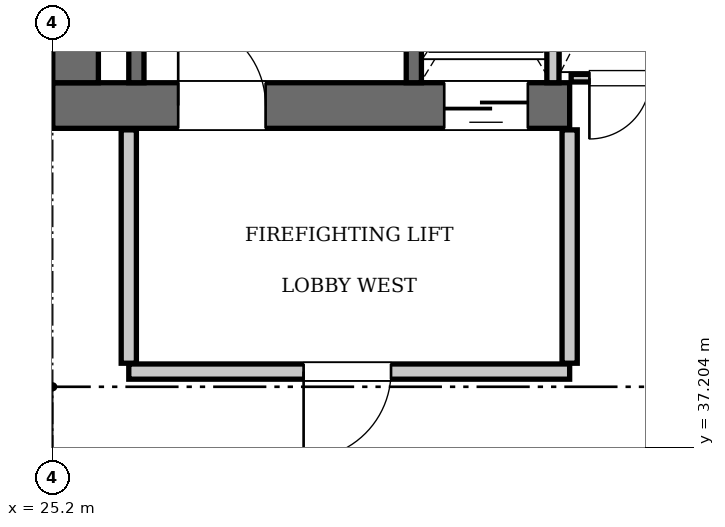
"""IFC4 building model, lengths in metres.
Left out: names, types, materials, properties, quantities, classifications, styles, units other than length and angle.
Written with IfcOpenShell. Run it as: python <this file> out.ifc"""

import sys

from ifc_helpers import new_model, si_unit, direction, frame, frame_2d, origin, place, context, subcontext, project, spatial, rectangle, extrude, element, fill, save


model = new_model("IFC4")
c1 = context("Model", 3, precision=1e-05, world=origin(), true_north=direction((0.0, 1.0)))
c2 = subcontext(c1, "Body", "Model", "MODEL_VIEW")
j1 = project(units=[si_unit("LENGTHUNIT", "METRE"), si_unit("PLANEANGLEUNIT", "RADIAN")], contexts=[c1])
p1 = place(None, origin())
s1 = spatial("IfcSite", under=j1, at=p1, CompositionType="ELEMENT")
p2 = place(p1, origin())
s2 = spatial("IfcBuilding", under=s1, at=p2, CompositionType="ELEMENT")
p3 = place(p2, frame((0.0, 0.0, 293.3)))
s3 = spatial("IfcBuildingStorey", under=s2, at=p3, CompositionType="ELEMENT", Elevation=293.3)
p4 = place(p3, frame((25.2, 41.7, 0.0), z_axis=(0.0, 0.0, 1.0), x_axis=(1.0, 0.0, 0.0)))
e1 = element("IfcWall", 1, at=p4, inside=s3, PredefinedType="SHEAR", context=c2, shape_type="SweptSolid", body=[
    extrude(rectangle(XDim=6.8, YDim=0.6, at=frame_2d((3.4, 0.0))), origin(), (0.0, 0.0, 1.0), 3.85),
])
p5 = place(p4, frame((1.65, 0.0, 0.0)))
e2 = element("IfcOpeningElement", 2, at=p5, cuts=e1, PredefinedType="OPENING", context=c2, shape_type="SweptSolid", body=[
    extrude(rectangle(XDim=1.15, YDim=2.15, at=frame_2d((0.575, 1.075))), frame((0.0, 0.31, 0.0), z_axis=(0.0, -1.0, 0.0), x_axis=(1.0, 0.0, 0.0)), (0.0, 0.0, 1.0), 0.62),
])
p6 = place(p4, frame((5.15, 0.0, 0.0)))
e3 = element("IfcOpeningElement", 3, at=p6, cuts=e1, PredefinedType="OPENING", context=c2, shape_type="SweptSolid", body=[
    extrude(rectangle(XDim=1.1, YDim=2.2, at=frame_2d((0.55, 1.1))), frame((0.0, 0.31, 0.0), z_axis=(0.0, -1.0, 0.0), x_axis=(1.0, 0.0, 0.0)), (0.0, 0.0, 1.0), 0.62),
])
p7 = place(p3, frame((25.5, 42.0, 0.0), z_axis=(0.0, 0.0, 1.0), x_axis=(0.0, 1.0, 0.0)))
e4 = element("IfcWall", 4, at=p7, inside=s3, PredefinedType="SHEAR", context=c2, shape_type="SweptSolid", body=[
    extrude(rectangle(XDim=2.2, YDim=0.6, at=frame_2d((1.1, 0.0))), origin(), (0.0, 0.0, 1.0), 3.85),
])
p8 = place(p3, frame((29.95, 42.0, 0.0), z_axis=(0.0, 0.0, 1.0), x_axis=(0.0, 1.0, 0.0)))
e5 = element("IfcWall", 5, at=p8, inside=s3, PredefinedType="SOLIDWALL", context=c2, shape_type="SweptSolid", body=[
    extrude(rectangle(XDim=9.15, YDim=0.2, at=frame_2d((4.575, 0.0))), origin(), (0.0, 0.0, 1.0), 3.61),
])
p9 = place(p3, frame((26.3, 42.0, 0.0), z_axis=(0.0, 0.0, 1.0), x_axis=(0.0, 1.0, 0.0)))
e6 = element("IfcWall", 6, at=p9, inside=s3, PredefinedType="SOLIDWALL", context=c2, shape_type="SweptSolid", body=[
    extrude(rectangle(XDim=9.12, YDim=0.2, at=frame_2d((4.56, 0.0))), origin(), (0.0, 0.0, 1.0), 3.61),
])
p10 = place(p3, frame((31.78, 42.0, 0.0), z_axis=(0.0, 0.0, 1.0), x_axis=(0.0, 1.0, 0.0)))
e7 = element("IfcWall", 7, at=p10, inside=s3, PredefinedType="SOLIDWALL", context=c2, shape_type="SweptSolid", body=[
    extrude(rectangle(XDim=2.74, YDim=0.16, at=frame_2d((1.37, 0.0))), origin(), (0.0, 0.0, 1.0), 3.61),
])
p11 = place(p3, frame((26.2, 38.2, 0.0), z_axis=(0.0, 0.0, 1.0), x_axis=(1.0, 0.0, 0.0)))
e8 = element("IfcWall", 8, at=p11, inside=s3, PredefinedType="PARTITIONING", context=c2, shape_type="SweptSolid", body=[
    extrude(rectangle(XDim=5.8, YDim=0.2, at=frame_2d((2.9, 0.0))), origin(), (0.0, 0.0, 1.0), 3.61),
])
p12 = place(p11, frame((2.3, 0.0, 0.0)))
e9 = element("IfcOpeningElement", 9, at=p12, cuts=e8, PredefinedType="OPENING", context=c2, shape_type="SweptSolid", body=[
    extrude(rectangle(XDim=1.15, YDim=2.15, at=frame_2d((0.575, 1.075))), frame((0.0, 0.11, 0.0), z_axis=(0.0, -1.0, 0.0), x_axis=(1.0, 0.0, 0.0)), (0.0, 0.0, 1.0), 0.22),
])
for number, where, z_axis, x_axis in (
    (10, (26.2, 38.31, 0.0), (0.0, 0.0, 1.0), (0.0, 1.0, 0.0)),
    (11, (32.0, 38.31, 0.0), (0.0, 0.0, 1.0), (0.0, 1.0, 0.0)),
):
    element("IfcWall", number, at=place(p3, frame(where, z_axis=z_axis, x_axis=x_axis)), inside=s3, PredefinedType="PARTITIONING", context=c2, shape_type="SweptSolid", body=[
        extrude(rectangle(XDim=3.07, YDim=0.2, at=frame_2d((1.535, 0.0))), origin(), (0.0, 0.0, 1.0), 3.61),
    ])
p13 = place(p3, frame((32.02, 42.06, 0.0), z_axis=(0.0, 0.0, 1.0), x_axis=(1.0, 0.0, 0.0)))
e12 = element("IfcWall", 12, at=p13, inside=s3, PredefinedType="PARTITIONING", context=c2, shape_type="SweptSolid", body=[
    extrude(rectangle(XDim=1.32, YDim=0.1, at=frame_2d((0.66, 0.0))), origin(), (0.0, 0.0, 1.0), 3.61),
])
p14 = place(p13, frame((0.24, 0.0, 0.0)))
e13 = element("IfcOpeningElement", 13, at=p14, cuts=e12, PredefinedType="OPENING", context=c2, shape_type="SweptSolid", body=[
    extrude(rectangle(XDim=0.8, YDim=2.05, at=frame_2d((0.4, 1.025))), frame((0.0, 0.06, 0.0), z_axis=(0.0, -1.0, 0.0), x_axis=(1.0, 0.0, 0.0)), (0.0, 0.0, 1.0), 0.12),
])
p15 = place(p5, origin())
e14 = element("IfcDoor", 14, at=p15, inside=s3, OperationType="SINGLE_SWING_LEFT", PredefinedType="DOOR", context=c2, shape_type="SweptSolid", body=[
    extrude(rectangle(XDim=1.15, YDim=2.15, at=frame_2d((0.575, 1.075))), frame((0.0, 0.025, 0.0), z_axis=(0.0, -1.0, 0.0), x_axis=(1.0, 0.0, 0.0)), (0.0, 0.0, 1.0), 0.05),
])
fill(e2, e14)
p16 = place(p6, frame((1.1, 0.0, 0.0), z_axis=(0.0, 0.0, 1.0), x_axis=(-1.0, 0.0, 0.0)))
e15 = element("IfcDoor", 15, at=p16, inside=s3, OperationType="SLIDING_TO_LEFT", PredefinedType="DOOR", context=c2, shape_type="SweptSolid", body=[
    extrude(rectangle(XDim=1.1, YDim=2.2, at=frame_2d((0.55, 1.1))), frame((0.0, 0.025, 0.0), z_axis=(0.0, -1.0, 0.0), x_axis=(1.0, 0.0, 0.0)), (0.0, 0.0, 1.0), 0.05),
])
fill(e3, e15)
p17 = place(p12, frame((1.15, 0.0, 0.0), z_axis=(0.0, 0.0, 1.0), x_axis=(-1.0, 0.0, 0.0)))
e16 = element("IfcDoor", 16, at=p17, inside=s3, OperationType="SINGLE_SWING_RIGHT", PredefinedType="DOOR", context=c2, shape_type="SweptSolid", body=[
    extrude(rectangle(XDim=1.15, YDim=2.15, at=frame_2d((0.575, 1.075))), frame((0.0, 0.025, 0.0), z_axis=(0.0, -1.0, 0.0), x_axis=(1.0, 0.0, 0.0)), (0.0, 0.0, 1.0), 0.05),
])
fill(e9, e16)
p18 = place(p14, frame((0.8, 0.0, 0.0), z_axis=(0.0, 0.0, 1.0), x_axis=(-1.0, 0.0, 0.0)))
e17 = element("IfcDoor", 17, at=p18, inside=s3, OperationType="SINGLE_SWING_RIGHT", PredefinedType="DOOR", context=c2, shape_type="SweptSolid", body=[
    extrude(rectangle(XDim=0.8, YDim=2.05, at=frame_2d((0.4, 1.025))), frame((0.0, 0.025, 0.0), z_axis=(0.0, -1.0, 0.0), x_axis=(1.0, 0.0, 0.0)), (0.0, 0.0, 1.0), 0.05),
])
fill(e13, e17)
save(model, sys.argv[1])
